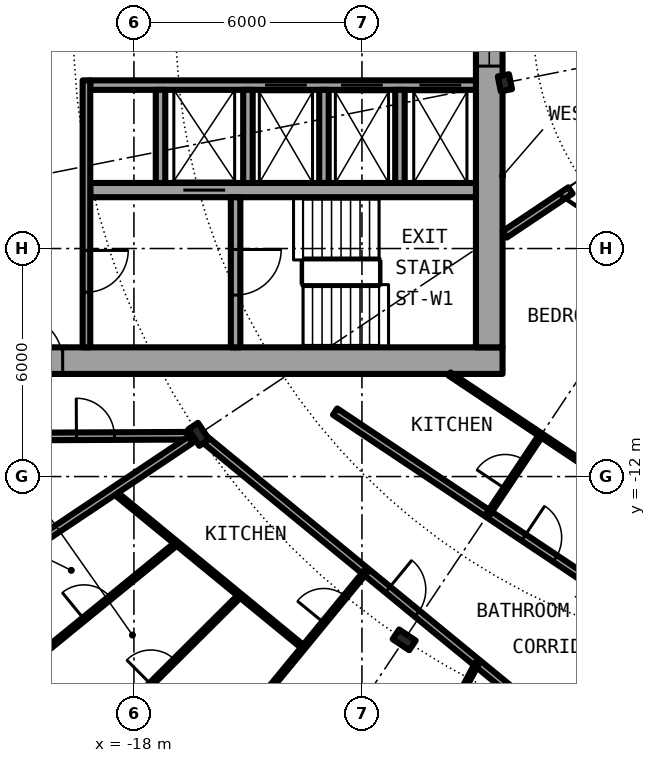
"""IFC4 building model, lengths in metres.
Left out: names, types, materials, properties, quantities, classifications, styles, units other than length and angle.
Written with IfcOpenShell. Run it as: python <this file> out.ifc"""

import sys

from ifc_helpers import new_model, si_unit, direction, frame, frame_2d, origin, origin_2d, place, context, subcontext, project, spatial, rectangle, i_section, extrude, element, fill, save


model = new_model("IFC4")
c1 = context("Model", 3, precision=1e-05, world=origin(), true_north=direction((0.0, 1.0)))
c2 = subcontext(c1, "Body", "Model", "MODEL_VIEW")
j1 = project(units=[si_unit("LENGTHUNIT", "METRE"), si_unit("PLANEANGLEUNIT", "RADIAN")], contexts=[c1])
p1 = place(None, origin())
s1 = spatial("IfcSite", under=j1, at=p1, CompositionType="ELEMENT")
p2 = place(p1, origin())
s2 = spatial("IfcBuilding", under=s1, at=p2, CompositionType="ELEMENT")
p3 = place(p2, frame((0.0, 0.0, 88.0)))
s3 = spatial("IfcBuildingStorey", under=s2, at=p3, CompositionType="ELEMENT", Elevation=88.0)
for number, where, z_axis, x_axis in (
    (1, (-16.297, -10.889, 0.0), (0.0, 0.0, 1.0), (-0.831, -0.556, 0.0)),
    (2, (-10.889, -16.297, 0.0), (0.0, 0.0, 1.0), (-0.556, -0.831, 0.0)),
):
    element("IfcColumn", number, at=place(p3, frame(where, z_axis=z_axis, x_axis=x_axis)), inside=s3, PredefinedType="COLUMN", context=c2, shape_type="SweptSolid", body=[
        extrude(i_section(OverallWidth=0.306, OverallDepth=0.524, WebThickness=0.021, FlangeThickness=0.04, FilletRadius=0.027, at=origin_2d()), origin(), (0.0, 0.0, 1.0), 3.05),
    ])
p4 = place(p3, frame((-8.239, -1.639, 0.0), z_axis=(0.0, 0.0, 1.0), x_axis=(-0.980785280403, -0.195090322016, 0.0)))
e3 = element("IfcColumn", 3, at=p4, inside=s3, PredefinedType="COLUMN", context=c2, shape_type="SweptSolid", body=[
    extrude(i_section(OverallWidth=0.3, OverallDepth=0.4, WebThickness=0.013, FlangeThickness=0.024, FilletRadius=0.027, at=origin_2d()), origin(), (0.0, 0.0, 1.0), 3.05),
])
p5 = place(p3, frame((-22.699, -15.167, 0.0), z_axis=(0.0, 0.0, 1.0), x_axis=(0.634382322723, -0.773019449054, 0.0)))
e4 = element("IfcWall", 4, at=p5, inside=s3, PredefinedType="SOLIDWALL", context=c2, shape_type="SweptSolid", body=[
    extrude(rectangle(XDim=5.352, YDim=0.25, at=frame_2d((2.676, 0.0))), origin(), (0.0, 0.0, 1.0), 2.7),
])
p6 = place(p5, frame((0.841, 0.0, 0.0)))
e5 = element("IfcOpeningElement", 5, at=p6, cuts=e4, PredefinedType="OPENING", context=c2, shape_type="SweptSolid", body=[
    extrude(rectangle(XDim=1.0, YDim=2.2, at=frame_2d((0.5, 1.1))), frame((0.0, 0.135, 0.0), z_axis=(0.0, -1.0, 0.0), x_axis=(1.0, 0.0, 0.0)), (0.0, 0.0, 1.0), 0.27),
])
p7 = place(p5, frame((3.111, 0.0, 0.3)))
e6 = element("IfcOpeningElement", 6, at=p7, cuts=e4, PredefinedType="OPENING", context=c2, shape_type="SweptSolid", body=[
    extrude(rectangle(XDim=1.8, YDim=2.1, at=frame_2d((0.9, 1.05))), frame((0.0, 0.135, 0.0), z_axis=(0.0, -1.0, 0.0), x_axis=(1.0, 0.0, 0.0)), (0.0, 0.0, 1.0), 0.27),
])
p8 = place(p3, frame((-22.3, -8.95, 0.0), z_axis=(0.0, 0.0, 1.0), x_axis=(1.0, 0.0, 0.0)))
e7 = element("IfcWall", 7, at=p8, inside=s3, PredefinedType="SHEAR", context=c2, shape_type="SweptSolid", body=[
    extrude(rectangle(XDim=14.0, YDim=0.7, at=frame_2d((7.0, 0.0))), origin(), (0.0, 0.0, 1.0), 3.05),
])
p9 = place(p8, frame((1.225, 0.0, 0.0)))
e8 = element("IfcOpeningElement", 8, at=p9, cuts=e7, PredefinedType="OPENING", context=c2, shape_type="SweptSolid", body=[
    extrude(rectangle(XDim=1.2, YDim=2.3, at=frame_2d((0.6, 1.15))), frame((0.0, 0.36, 0.0), z_axis=(0.0, -1.0, 0.0), x_axis=(1.0, 0.0, 0.0)), (0.0, 0.0, 1.0), 0.72),
])
p10 = place(p3, frame((-8.65, 8.6, 0.0), z_axis=(0.0, 0.0, 1.0), x_axis=(0.0, -1.0, 0.0)))
e9 = element("IfcWall", 9, at=p10, inside=s3, PredefinedType="SHEAR", context=c2, shape_type="SweptSolid", body=[
    extrude(rectangle(XDim=17.2, YDim=0.7, at=frame_2d((8.6, 0.0))), origin(), (0.0, 0.0, 1.0), 3.05),
])
p11 = place(p10, frame((7.4, 0.0, 0.1)))
e10 = element("IfcOpeningElement", 10, at=p11, cuts=e9, PredefinedType="OPENING", context=c2, shape_type="SweptSolid", body=[
    extrude(rectangle(XDim=2.4, YDim=2.2, at=frame_2d((1.2, 1.1))), frame((0.0, 0.36, 0.0), z_axis=(0.0, -1.0, 0.0), x_axis=(1.0, 0.0, 0.0)), (0.0, 0.0, 1.0), 0.72),
])
p12 = place(p3, frame((-9.0, -1.7, 0.0), z_axis=(0.0, 0.0, 1.0), x_axis=(-1.0, 0.0, 0.0)))
e11 = element("IfcWall", 11, at=p12, inside=s3, PredefinedType="SHEAR", context=c2, shape_type="SweptSolid", body=[
    extrude(rectangle(XDim=10.15, YDim=0.25, at=frame_2d((5.075, 0.0))), origin(), (0.0, 0.0, 1.0), 3.05),
])
p13 = place(p12, frame((0.387, 0.0, 0.0)))
e12 = element("IfcOpeningElement", 12, at=p13, cuts=e11, PredefinedType="OPENING", context=c2, shape_type="SweptSolid", body=[
    extrude(rectangle(XDim=1.1, YDim=2.3, at=frame_2d((0.55, 1.15))), frame((0.0, 0.135, 0.0), z_axis=(0.0, -1.0, 0.0), x_axis=(1.0, 0.0, 0.0)), (0.0, 0.0, 1.0), 0.27),
])
p14 = place(p12, frame((2.45, 0.0, 0.0)))
e13 = element("IfcOpeningElement", 13, at=p14, cuts=e11, PredefinedType="OPENING", context=c2, shape_type="SweptSolid", body=[
    extrude(rectangle(XDim=1.1, YDim=2.3, at=frame_2d((0.55, 1.15))), frame((0.0, 0.135, 0.0), z_axis=(0.0, -1.0, 0.0), x_axis=(1.0, 0.0, 0.0)), (0.0, 0.0, 1.0), 0.27),
])
p15 = place(p12, frame((4.45, 0.0, 0.0)))
e14 = element("IfcOpeningElement", 14, at=p15, cuts=e11, PredefinedType="OPENING", context=c2, shape_type="SweptSolid", body=[
    extrude(rectangle(XDim=1.1, YDim=2.3, at=frame_2d((0.55, 1.15))), frame((0.0, 0.135, 0.0), z_axis=(0.0, -1.0, 0.0), x_axis=(1.0, 0.0, 0.0)), (0.0, 0.0, 1.0), 0.27),
])
p16 = place(p3, frame((-9.0, -4.462, 0.0), z_axis=(0.0, 0.0, 1.0), x_axis=(-1.0, 0.0, 0.0)))
e15 = element("IfcWall", 15, at=p16, inside=s3, PredefinedType="SHEAR", context=c2, shape_type="SweptSolid", body=[
    extrude(rectangle(XDim=10.15, YDim=0.375, at=frame_2d((5.075, 0.0))), origin(), (0.0, 0.0, 1.0), 3.05),
])
p17 = place(p16, frame((6.6, 0.0, 0.0)))
e16 = element("IfcOpeningElement", 16, at=p17, cuts=e15, PredefinedType="OPENING", context=c2, shape_type="SweptSolid", body=[
    extrude(rectangle(XDim=1.1, YDim=2.3, at=frame_2d((0.55, 1.15))), frame((0.0, 0.198, 0.0), z_axis=(0.0, -1.0, 0.0), x_axis=(1.0, 0.0, 0.0)), (0.0, 0.0, 1.0), 0.395),
])
p18 = place(p3, frame((-15.325, -4.65, 0.0), z_axis=(0.0, 0.0, 1.0), x_axis=(0.0, -1.0, 0.0)))
e17 = element("IfcWall", 17, at=p18, inside=s3, PredefinedType="SHEAR", context=c2, shape_type="SweptSolid", body=[
    extrude(rectangle(XDim=3.95, YDim=0.25, at=frame_2d((1.975, 0.0))), origin(), (0.0, 0.0, 1.0), 3.05),
])
p19 = place(p18, frame((1.375, 0.0, 0.0)))
e18 = element("IfcOpeningElement", 18, at=p19, cuts=e17, PredefinedType="OPENING", context=c2, shape_type="SweptSolid", body=[
    extrude(rectangle(XDim=1.2, YDim=2.3, at=frame_2d((0.6, 1.15))), frame((0.0, 0.135, 0.0), z_axis=(0.0, -1.0, 0.0), x_axis=(1.0, 0.0, 0.0)), (0.0, 0.0, 1.0), 0.27),
])
for number, where, z_axis, x_axis in (
    (19, (-15.0, -1.825, 0.0), (0.0, 0.0, 1.0), (0.0, -1.0, 0.0)),
    (20, (-17.3, -1.825, 0.0), (0.0, 0.0, 1.0), (0.0, -1.0, 0.0)),
):
    element("IfcWall", number, at=place(p3, frame(where, z_axis=z_axis, x_axis=x_axis)), inside=s3, PredefinedType="SOLIDWALL", context=c2, shape_type="SweptSolid", body=[
        extrude(rectangle(XDim=2.45, YDim=0.25, at=frame_2d((1.225, 0.0))), origin(), (0.0, 0.0, 1.0), 2.7),
    ])
p20 = place(p3, frame((-19.25, -1.575, 0.0), z_axis=(0.0, 0.0, 1.0), x_axis=(0.0, -1.0, 0.0)))
e21 = element("IfcWall", 21, at=p20, inside=s3, PredefinedType="SOLIDWALL", context=c2, shape_type="SweptSolid", body=[
    extrude(rectangle(XDim=7.025, YDim=0.2, at=frame_2d((3.513, 0.0))), origin(), (0.0, 0.0, 1.0), 2.7),
])
p21 = place(p20, frame((4.475, 0.0, 0.0)))
e22 = element("IfcOpeningElement", 22, at=p21, cuts=e21, PredefinedType="OPENING", context=c2, shape_type="SweptSolid", body=[
    extrude(rectangle(XDim=1.1, YDim=2.3, at=frame_2d((0.55, 1.15))), frame((0.0, 0.11, 0.0), z_axis=(0.0, -1.0, 0.0), x_axis=(1.0, 0.0, 0.0)), (0.0, 0.0, 1.0), 0.22),
])
for number, where, z_axis, x_axis in (
    (23, (-11.0, -1.825, 0.0), (0.0, 0.0, 1.0), (0.0, -1.0, 0.0)),
    (24, (-13.0, -1.825, 0.0), (0.0, 0.0, 1.0), (0.0, -1.0, 0.0)),
):
    element("IfcWall", number, at=place(p3, frame(where, z_axis=z_axis, x_axis=x_axis)), inside=s3, PredefinedType="SOLIDWALL", context=c2, shape_type="SweptSolid", body=[
        extrude(rectangle(XDim=2.45, YDim=0.25, at=frame_2d((1.225, 0.0))), origin(), (0.0, 0.0, 1.0), 2.7),
    ])
p22 = place(p3, frame((-18.542, -12.389, 0.0), z_axis=(0.0, 0.0, 1.0), x_axis=(0.77296666644, -0.634446634929, 0.0)))
e25 = element("IfcWall", 25, at=p22, inside=s3, PredefinedType="PARTITIONING", context=c2, shape_type="SweptSolid", body=[
    extrude(rectangle(XDim=6.474, YDim=0.1, at=frame_2d((3.237, 0.0))), origin(), (0.0, 0.0, 1.0), 2.7),
])
p23 = place(p3, frame((-16.173, -10.991, 0.0), z_axis=(0.0, 0.0, 1.0), x_axis=(0.773013989296, -0.634388975591, 0.0)))
e26 = element("IfcWall", 26, at=p23, inside=s3, PredefinedType="PARTITIONING", context=c2, shape_type="SweptSolid", body=[
    extrude(rectangle(XDim=11.219, YDim=0.2, at=frame_2d((5.609, 0.0))), origin(), (0.0, 0.0, 1.0), 2.38),
])
p24 = place(p23, frame((6.278, 0.0, 0.0)))
e27 = element("IfcOpeningElement", 27, at=p24, cuts=e26, PredefinedType="OPENING", context=c2, shape_type="SweptSolid", body=[
    extrude(rectangle(XDim=1.0, YDim=2.3, at=frame_2d((0.5, 1.15))), frame((0.0, 0.11, 0.0), z_axis=(0.0, -1.0, 0.0), x_axis=(1.0, 0.0, 0.0)), (0.0, 0.0, 1.0), 0.22),
])
p25 = place(p3, frame((-12.706, -10.291, 0.0), z_axis=(0.0, 0.0, 1.0), x_axis=(0.831588572532, -0.555392155178, 0.0)))
e28 = element("IfcWall", 28, at=p25, inside=s3, PredefinedType="PARTITIONING", context=c2, shape_type="SweptSolid", body=[
    extrude(rectangle(XDim=11.314, YDim=0.2, at=frame_2d((5.657, 0.0))), origin(), (0.0, 0.0, 1.0), 2.7),
])
p26 = place(p25, frame((5.966, 0.0, 0.0)))
e29 = element("IfcOpeningElement", 29, at=p26, cuts=e28, PredefinedType="OPENING", context=c2, shape_type="SweptSolid", body=[
    extrude(rectangle(XDim=1.0, YDim=2.3, at=frame_2d((0.5, 1.15))), frame((0.0, 0.11, 0.0), z_axis=(0.0, -1.0, 0.0), x_axis=(1.0, 0.0, 0.0)), (0.0, 0.0, 1.0), 0.22),
])
p27 = place(p3, frame((-9.693, -9.302, 0.0), z_axis=(0.0, 0.0, 1.0), x_axis=(0.831546497949, -0.555455148278, 0.0)))
e30 = element("IfcWall", 30, at=p27, inside=s3, PredefinedType="PARTITIONING", context=c2, shape_type="SweptSolid", body=[
    extrude(rectangle(XDim=4.252, YDim=0.1, at=frame_2d((2.126, 0.0))), origin(), (0.0, 0.0, 1.0), 2.7),
])
p28 = place(p3, frame((-21.675, -10.95, 0.0), z_axis=(0.0, 0.0, 1.0), x_axis=(0.999988944514, 0.004702217579, 0.0)))
e31 = element("IfcWall", 31, at=p28, inside=s3, PredefinedType="PARTITIONING", context=c2, shape_type="SweptSolid", body=[
    extrude(rectangle(XDim=5.088, YDim=0.2, at=frame_2d((2.544, 0.0))), origin(), (0.0, 0.0, 1.0), 2.7),
])
p29 = place(p28, frame((2.162, 0.0, 0.0)))
e32 = element("IfcOpeningElement", 32, at=p29, cuts=e31, PredefinedType="OPENING", context=c2, shape_type="SweptSolid", body=[
    extrude(rectangle(XDim=1.0, YDim=2.3, at=frame_2d((0.5, 1.15))), frame((0.0, 0.11, 0.0), z_axis=(0.0, -1.0, 0.0), x_axis=(1.0, 0.0, 0.0)), (0.0, 0.0, 1.0), 0.22),
])
p30 = place(p3, frame((-6.513, -4.472, 0.0), z_axis=(0.0, 0.0, 1.0), x_axis=(-0.831382204863, -0.555701025225, 0.0)))
e33 = element("IfcWall", 33, at=p30, inside=s3, PredefinedType="PARTITIONING", context=c2, shape_type="SweptSolid", body=[
    extrude(rectangle(XDim=2.082, YDim=0.2, at=frame_2d((1.041, 0.0))), origin(), (0.0, 0.0, 1.0), 2.7),
])
p31 = place(p3, frame((-22.595, -15.097, 0.0), z_axis=(0.0, 0.0, 1.0), x_axis=(0.831505405283, 0.555516661303, 0.0)))
e34 = element("IfcWall", 34, at=p31, inside=s3, PredefinedType="PARTITIONING", context=c2, shape_type="SweptSolid", body=[
    extrude(rectangle(XDim=7.312, YDim=0.2, at=frame_2d((3.656, 0.0))), origin(), (0.0, 0.0, 1.0), 2.7),
])
p32 = place(p3, frame((-21.061, -17.173, 0.0), z_axis=(0.0, 0.0, 1.0), x_axis=(0.774926754572, 0.632051046236, 0.0)))
e35 = element("IfcWall", 35, at=p32, inside=s3, PredefinedType="PARTITIONING", context=c2, shape_type="SweptSolid", body=[
    extrude(rectangle(XDim=5.403, YDim=0.1, at=frame_2d((2.702, 0.0))), origin(), (0.0, 0.0, 1.0), 2.7),
])
p33 = place(p32, frame((2.252, 0.0, 0.0)))
e36 = element("IfcOpeningElement", 36, at=p33, cuts=e35, PredefinedType="OPENING", context=c2, shape_type="SweptSolid", body=[
    extrude(rectangle(XDim=0.9, YDim=2.3, at=frame_2d((0.45, 1.15))), frame((0.0, 0.06, 0.0), z_axis=(0.0, -1.0, 0.0), x_axis=(1.0, 0.0, 0.0)), (0.0, 0.0, 1.0), 0.12),
])
p34 = place(p3, frame((-19.265, -19.166, 0.0), z_axis=(0.0, 0.0, 1.0), x_axis=(0.708831450128, 0.705377895393, 0.0)))
e37 = element("IfcWall", 37, at=p34, inside=s3, PredefinedType="PARTITIONING", context=c2, shape_type="SweptSolid", body=[
    extrude(rectangle(XDim=5.726, YDim=0.1, at=frame_2d((2.863, 0.0))), origin(), (0.0, 0.0, 1.0), 2.7),
])
p35 = place(p34, frame((2.413, 0.0, 0.0)))
e38 = element("IfcOpeningElement", 38, at=p35, cuts=e37, PredefinedType="OPENING", context=c2, shape_type="SweptSolid", body=[
    extrude(rectangle(XDim=0.9, YDim=2.3, at=frame_2d((0.45, 1.15))), frame((0.0, 0.06, 0.0), z_axis=(0.0, -1.0, 0.0), x_axis=(1.0, 0.0, 0.0)), (0.0, 0.0, 1.0), 0.12),
])
p36 = place(p3, frame((-17.241, -21.006, 0.0), z_axis=(0.0, 0.0, 1.0), x_axis=(0.634522338131, 0.772904523478, 0.0)))
e39 = element("IfcWall", 39, at=p36, inside=s3, PredefinedType="PARTITIONING", context=c2, shape_type="SweptSolid", body=[
    extrude(rectangle(XDim=8.419, YDim=0.1, at=frame_2d((4.209, 0.0))), origin(), (0.0, 0.0, 1.0), 2.7),
])
p37 = place(p36, frame((6.677, 0.0, 0.0)))
e40 = element("IfcOpeningElement", 40, at=p37, cuts=e39, PredefinedType="OPENING", context=c2, shape_type="SweptSolid", body=[
    extrude(rectangle(XDim=0.9, YDim=2.3, at=frame_2d((0.45, 1.15))), frame((0.0, 0.06, 0.0), z_axis=(0.0, -1.0, 0.0), x_axis=(1.0, 0.0, 0.0)), (0.0, 0.0, 1.0), 0.12),
])
p38 = place(p36, frame((2.466, 0.0, 0.0)))
e41 = element("IfcOpeningElement", 41, at=p38, cuts=e39, PredefinedType="OPENING", context=c2, shape_type="SweptSolid", body=[
    extrude(rectangle(XDim=0.9, YDim=2.3, at=frame_2d((0.45, 1.15))), frame((0.0, 0.06, 0.0), z_axis=(0.0, -1.0, 0.0), x_axis=(1.0, 0.0, 0.0)), (0.0, 0.0, 1.0), 0.12),
])
p39 = place(p3, frame((-10.202, -19.234, 0.0), z_axis=(0.0, 0.0, 1.0), x_axis=(0.468462103808, 0.883483591979, 0.0)))
e42 = element("IfcWall", 42, at=p39, inside=s3, PredefinedType="PARTITIONING", context=c2, shape_type="SweptSolid", body=[
    extrude(rectangle(XDim=2.636, YDim=0.1, at=frame_2d((1.318, 0.0))), origin(), (0.0, 0.0, 1.0), 2.7),
])
p40 = place(p39, frame((0.868, 0.0, 0.0)))
e43 = element("IfcOpeningElement", 43, at=p40, cuts=e42, PredefinedType="OPENING", context=c2, shape_type="SweptSolid", body=[
    extrude(rectangle(XDim=0.9, YDim=2.3, at=frame_2d((0.45, 1.15))), frame((0.0, 0.06, 0.0), z_axis=(0.0, -1.0, 0.0), x_axis=(1.0, 0.0, 0.0)), (0.0, 0.0, 1.0), 0.12),
])
p41 = place(p3, frame((-8.674, -12.982, 0.0), z_axis=(0.0, 0.0, 1.0), x_axis=(0.555355163998, 0.831613276602, 0.0)))
e44 = element("IfcWall", 44, at=p41, inside=s3, PredefinedType="PARTITIONING", context=c2, shape_type="SweptSolid", body=[
    extrude(rectangle(XDim=2.494, YDim=0.1, at=frame_2d((1.247, 0.0))), origin(), (0.0, 0.0, 1.0), 2.7),
])
p42 = place(p41, frame((0.797, 0.0, 0.0)))
e45 = element("IfcOpeningElement", 45, at=p42, cuts=e44, PredefinedType="OPENING", context=c2, shape_type="SweptSolid", body=[
    extrude(rectangle(XDim=0.9, YDim=2.3, at=frame_2d((0.45, 1.15))), frame((0.0, 0.06, 0.0), z_axis=(0.0, -1.0, 0.0), x_axis=(1.0, 0.0, 0.0)), (0.0, 0.0, 1.0), 0.12),
])
p43 = place(p13, origin())
e46 = element("IfcDoor", 46, at=p43, inside=s3, OperationType="DOUBLE_DOOR_SLIDING", PredefinedType="DOOR", context=c2, shape_type="SweptSolid", body=[
    extrude(rectangle(XDim=1.1, YDim=2.3, at=frame_2d((0.55, 1.15))), frame((0.0, 0.025, 0.0), z_axis=(0.0, -1.0, 0.0), x_axis=(1.0, 0.0, 0.0)), (0.0, 0.0, 1.0), 0.05),
])
fill(e12, e46)
p44 = place(p14, origin())
e47 = element("IfcDoor", 47, at=p44, inside=s3, OperationType="DOUBLE_DOOR_SLIDING", PredefinedType="DOOR", context=c2, shape_type="SweptSolid", body=[
    extrude(rectangle(XDim=1.1, YDim=2.3, at=frame_2d((0.55, 1.15))), frame((0.0, 0.025, 0.0), z_axis=(0.0, -1.0, 0.0), x_axis=(1.0, 0.0, 0.0)), (0.0, 0.0, 1.0), 0.05),
])
fill(e13, e47)
p45 = place(p15, origin())
e48 = element("IfcDoor", 48, at=p45, inside=s3, OperationType="DOUBLE_DOOR_SLIDING", PredefinedType="DOOR", context=c2, shape_type="SweptSolid", body=[
    extrude(rectangle(XDim=1.1, YDim=2.3, at=frame_2d((0.55, 1.15))), frame((0.0, 0.025, 0.0), z_axis=(0.0, -1.0, 0.0), x_axis=(1.0, 0.0, 0.0)), (0.0, 0.0, 1.0), 0.05),
])
fill(e14, e48)
p46 = place(p17, origin())
e49 = element("IfcDoor", 49, at=p46, inside=s3, OperationType="DOUBLE_DOOR_SLIDING", PredefinedType="DOOR", context=c2, shape_type="SweptSolid", body=[
    extrude(rectangle(XDim=1.1, YDim=2.3, at=frame_2d((0.55, 1.15))), frame((0.0, 0.025, 0.0), z_axis=(0.0, -1.0, 0.0), x_axis=(1.0, 0.0, 0.0)), (0.0, 0.0, 1.0), 0.05),
])
fill(e16, e49)
p47 = place(p19, origin())
e50 = element("IfcDoor", 50, at=p47, inside=s3, OperationType="SINGLE_SWING_LEFT", PredefinedType="DOOR", context=c2, shape_type="SweptSolid", body=[
    extrude(rectangle(XDim=1.2, YDim=2.3, at=frame_2d((0.6, 1.15))), frame((0.0, 0.025, 0.0), z_axis=(0.0, -1.0, 0.0), x_axis=(1.0, 0.0, 0.0)), (0.0, 0.0, 1.0), 0.05),
])
fill(e18, e50)
p48 = place(p21, origin())
e51 = element("IfcDoor", 51, at=p48, inside=s3, OperationType="SINGLE_SWING_LEFT", PredefinedType="DOOR", context=c2, shape_type="SweptSolid", body=[
    extrude(rectangle(XDim=1.1, YDim=2.3, at=frame_2d((0.55, 1.15))), frame((0.0, 0.025, 0.0), z_axis=(0.0, -1.0, 0.0), x_axis=(1.0, 0.0, 0.0)), (0.0, 0.0, 1.0), 0.05),
])
fill(e22, e51)
p49 = place(p9, origin())
e52 = element("IfcDoor", 52, at=p49, inside=s3, OperationType="SINGLE_SWING_RIGHT", PredefinedType="DOOR", context=c2, shape_type="SweptSolid", body=[
    extrude(rectangle(XDim=1.2, YDim=2.3, at=frame_2d((0.6, 1.15))), frame((0.0, 0.025, 0.0), z_axis=(0.0, -1.0, 0.0), x_axis=(1.0, 0.0, 0.0)), (0.0, 0.0, 1.0), 0.05),
])
fill(e8, e52)
p50 = place(p11, origin())
e53 = element("IfcWindow", 53, at=p50, inside=s3, PartitioningType="SINGLE_PANEL", PredefinedType="WINDOW", context=c2, shape_type="SweptSolid", body=[
    extrude(rectangle(XDim=2.4, YDim=2.2, at=frame_2d((1.2, 1.1))), frame((0.0, 0.03, 0.0), z_axis=(0.0, -1.0, 0.0), x_axis=(1.0, 0.0, 0.0)), (0.0, 0.0, 1.0), 0.06),
])
fill(e10, e53)
p51 = place(p24, origin())
e54 = element("IfcDoor", 54, at=p51, inside=s3, OperationType="SINGLE_SWING_RIGHT", PredefinedType="DOOR", context=c2, shape_type="SweptSolid", body=[
    extrude(rectangle(XDim=1.0, YDim=2.3, at=frame_2d((0.5, 1.15))), frame((0.0, 0.025, 0.0), z_axis=(0.0, -1.0, 0.0), x_axis=(1.0, 0.0, 0.0)), (0.0, 0.0, 1.0), 0.05),
])
fill(e27, e54)
p52 = place(p37, origin())
e55 = element("IfcDoor", 55, at=p52, inside=s3, OperationType="SINGLE_SWING_RIGHT", PredefinedType="DOOR", context=c2, shape_type="SweptSolid", body=[
    extrude(rectangle(XDim=0.9, YDim=2.3, at=frame_2d((0.45, 1.15))), frame((0.0, 0.025, 0.0), z_axis=(0.0, -1.0, 0.0), x_axis=(1.0, 0.0, 0.0)), (0.0, 0.0, 1.0), 0.05),
])
fill(e40, e55)
p53 = place(p35, origin())
e56 = element("IfcDoor", 56, at=p53, inside=s3, OperationType="SINGLE_SWING_LEFT", PredefinedType="DOOR", context=c2, shape_type="SweptSolid", body=[
    extrude(rectangle(XDim=0.9, YDim=2.3, at=frame_2d((0.45, 1.15))), frame((0.0, 0.025, 0.0), z_axis=(0.0, -1.0, 0.0), x_axis=(1.0, 0.0, 0.0)), (0.0, 0.0, 1.0), 0.05),
])
fill(e38, e56)
p54 = place(p33, origin())
e57 = element("IfcDoor", 57, at=p54, inside=s3, OperationType="SINGLE_SWING_RIGHT", PredefinedType="DOOR", context=c2, shape_type="SweptSolid", body=[
    extrude(rectangle(XDim=0.9, YDim=2.3, at=frame_2d((0.45, 1.15))), frame((0.0, 0.025, 0.0), z_axis=(0.0, -1.0, 0.0), x_axis=(1.0, 0.0, 0.0)), (0.0, 0.0, 1.0), 0.05),
])
fill(e36, e57)
p55 = place(p26, origin())
e58 = element("IfcDoor", 58, at=p55, inside=s3, OperationType="SINGLE_SWING_RIGHT", PredefinedType="DOOR", context=c2, shape_type="SweptSolid", body=[
    extrude(rectangle(XDim=1.0, YDim=2.3, at=frame_2d((0.5, 1.15))), frame((0.0, 0.025, 0.0), z_axis=(0.0, -1.0, 0.0), x_axis=(1.0, 0.0, 0.0)), (0.0, 0.0, 1.0), 0.05),
])
fill(e29, e58)
p56 = place(p42, origin())
e59 = element("IfcDoor", 59, at=p56, inside=s3, OperationType="SINGLE_SWING_RIGHT", PredefinedType="DOOR", context=c2, shape_type="SweptSolid", body=[
    extrude(rectangle(XDim=0.9, YDim=2.3, at=frame_2d((0.45, 1.15))), frame((0.0, 0.025, 0.0), z_axis=(0.0, -1.0, 0.0), x_axis=(1.0, 0.0, 0.0)), (0.0, 0.0, 1.0), 0.05),
])
fill(e45, e59)
p57 = place(p29, origin())
e60 = element("IfcDoor", 60, at=p57, inside=s3, OperationType="SINGLE_SWING_RIGHT", PredefinedType="DOOR", context=c2, shape_type="SweptSolid", body=[
    extrude(rectangle(XDim=1.0, YDim=2.3, at=frame_2d((0.5, 1.15))), frame((0.0, 0.025, 0.0), z_axis=(0.0, -1.0, 0.0), x_axis=(1.0, 0.0, 0.0)), (0.0, 0.0, 1.0), 0.05),
])
fill(e32, e60)
save(model, sys.argv[1])
